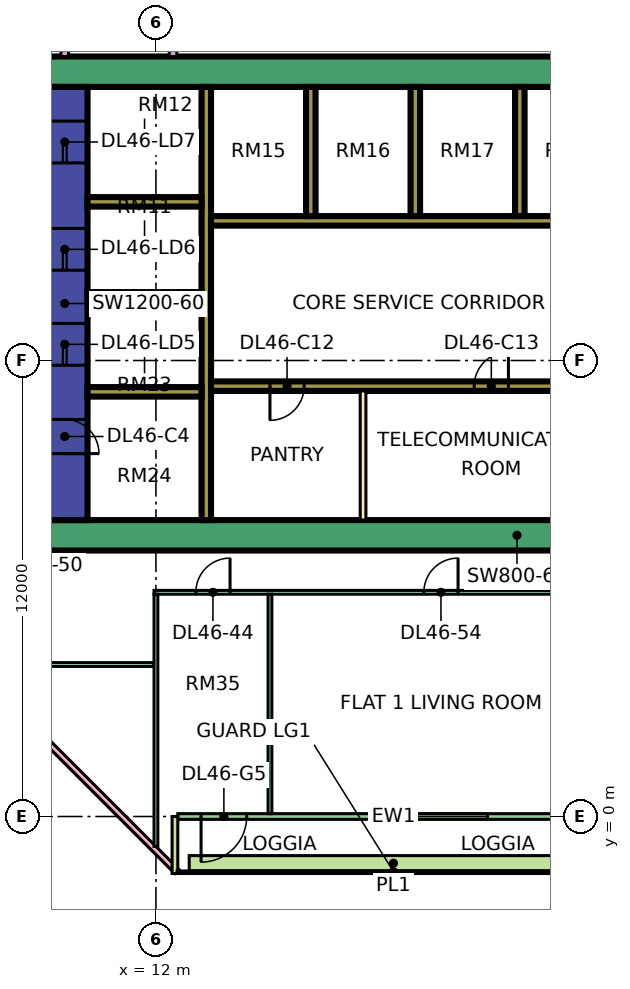
"""IFC4 building model, lengths in metres.
Left out: names, types, materials, properties, quantities, classifications, styles, units other than length and angle.
Written with IfcOpenShell. Run it as: python <this file> out.ifc"""

import sys

from ifc_helpers import new_model, si_unit, direction, frame, frame_2d, origin, place, context, subcontext, project, spatial, rectangle, extrude, element, fill, save


model = new_model("IFC4")
c1 = context("Model", 3, precision=1e-05, world=origin(), true_north=direction((0.0, 1.0)))
c2 = subcontext(c1, "Body", "Model", "MODEL_VIEW")
j1 = project(units=[si_unit("LENGTHUNIT", "METRE"), si_unit("PLANEANGLEUNIT", "RADIAN")], contexts=[c1])
p1 = place(None, origin())
s1 = spatial("IfcSite", under=j1, at=p1, CompositionType="ELEMENT")
p2 = place(p1, origin())
s2 = spatial("IfcBuilding", under=s1, at=p2, CompositionType="ELEMENT")
p3 = place(p2, frame((0.0, 0.0, 198.65)))
s3 = spatial("IfcBuildingStorey", under=s2, at=p3, CompositionType="ELEMENT", Elevation=198.65)
p4 = place(p3, frame((9.0, 7.4, 0.0), z_axis=(0.0, 0.0, 1.0), x_axis=(1.0, 0.0, 0.0)))
e1 = element("IfcWall", 1, at=p4, inside=s3, PredefinedType="SHEAR", context=c2, shape_type="SweptSolid", body=[
    extrude(rectangle(XDim=25.0, YDim=0.8, at=frame_2d((12.5, 0.0))), origin(), (0.0, 0.0, 1.0), 3.75),
])
p5 = place(p3, frame((9.0, 19.6, 0.0), z_axis=(0.0, 0.0, 1.0), x_axis=(1.0, 0.0, 0.0)))
e2 = element("IfcWall", 2, at=p5, inside=s3, PredefinedType="SHEAR", context=c2, shape_type="SweptSolid", body=[
    extrude(rectangle(XDim=25.0, YDim=0.8, at=frame_2d((12.5, 0.0))), origin(), (0.0, 0.0, 1.0), 3.75),
])
p6 = place(p5, frame((19.1, 0.0, 0.0)))
e3 = element("IfcOpeningElement", 3, at=p6, cuts=e2, PredefinedType="OPENING", context=c2, shape_type="SweptSolid", body=[
    extrude(rectangle(XDim=1.8, YDim=2.4, at=frame_2d((0.9, 1.2))), frame((0.0, 0.41, 0.0), z_axis=(0.0, -1.0, 0.0), x_axis=(1.0, 0.0, 0.0)), (0.0, 0.0, 1.0), 0.82),
])
p7 = place(p3, frame((9.6, 7.8, 0.0), z_axis=(0.0, 0.0, 1.0), x_axis=(0.0, 1.0, 0.0)))
e4 = element("IfcWall", 4, at=p7, inside=s3, PredefinedType="SHEAR", context=c2, shape_type="SweptSolid", body=[
    extrude(rectangle(XDim=11.4, YDim=1.2, at=frame_2d((5.7, 0.0))), origin(), (0.0, 0.0, 1.0), 3.75),
])
p8 = place(p7, frame((4.075, 0.0, 0.0)))
e5 = element("IfcOpeningElement", 5, at=p8, cuts=e4, PredefinedType="OPENING", context=c2, shape_type="SweptSolid", body=[
    extrude(rectangle(XDim=1.1, YDim=2.2, at=frame_2d((0.55, 1.1))), frame((0.0, 0.61, 0.0), z_axis=(0.0, -1.0, 0.0), x_axis=(1.0, 0.0, 0.0)), (0.0, 0.0, 1.0), 1.22),
])
p9 = place(p7, frame((6.575, 0.0, 0.0)))
e6 = element("IfcOpeningElement", 6, at=p9, cuts=e4, PredefinedType="OPENING", context=c2, shape_type="SweptSolid", body=[
    extrude(rectangle(XDim=1.1, YDim=2.2, at=frame_2d((0.55, 1.1))), frame((0.0, 0.61, 0.0), z_axis=(0.0, -1.0, 0.0), x_axis=(1.0, 0.0, 0.0)), (0.0, 0.0, 1.0), 1.22),
])
p10 = place(p7, frame((9.4, 0.0, 0.0)))
e7 = element("IfcOpeningElement", 7, at=p10, cuts=e4, PredefinedType="OPENING", context=c2, shape_type="SweptSolid", body=[
    extrude(rectangle(XDim=1.1, YDim=2.2, at=frame_2d((0.55, 1.1))), frame((0.0, 0.61, 0.0), z_axis=(0.0, -1.0, 0.0), x_axis=(1.0, 0.0, 0.0)), (0.0, 0.0, 1.0), 1.22),
])
p11 = place(p7, frame((1.75, 0.0, 0.0)))
e8 = element("IfcOpeningElement", 8, at=p11, cuts=e4, PredefinedType="OPENING", context=c2, shape_type="SweptSolid", body=[
    extrude(rectangle(XDim=0.9, YDim=2.1, at=frame_2d((0.45, 1.05))), frame((0.0, 0.61, 0.0), z_axis=(0.0, -1.0, 0.0), x_axis=(1.0, 0.0, 0.0)), (0.0, 0.0, 1.0), 1.22),
])
p12 = place(p3, frame((13.325, 7.8, 0.0), z_axis=(0.0, 0.0, 1.0), x_axis=(0.0, 1.0, 0.0)))
e9 = element("IfcWall", 9, at=p12, inside=s3, PredefinedType="SHEAR", context=c2, shape_type="SweptSolid", body=[
    extrude(rectangle(XDim=11.4, YDim=0.25, at=frame_2d((5.7, 0.0))), origin(), (0.0, 0.0, 1.0), 3.75),
])
p13 = place(p3, frame((13.45, 11.325, 0.0), z_axis=(0.0, 0.0, 1.0), x_axis=(1.0, 0.0, 0.0)))
e10 = element("IfcWall", 10, at=p13, inside=s3, PredefinedType="SHEAR", context=c2, shape_type="SweptSolid", body=[
    extrude(rectangle(XDim=19.75, YDim=0.25, at=frame_2d((9.875, 0.0))), origin(), (0.0, 0.0, 1.0), 3.75),
])
p14 = place(p13, frame((11.65, 0.0, 0.0)))
e11 = element("IfcOpeningElement", 11, at=p14, cuts=e10, PredefinedType="OPENING", context=c2, shape_type="SweptSolid", body=[
    extrude(rectangle(XDim=1.2, YDim=2.2, at=frame_2d((0.6, 1.1))), frame((0.0, 0.135, 0.0), z_axis=(0.0, -1.0, 0.0), x_axis=(1.0, 0.0, 0.0)), (0.0, 0.0, 1.0), 0.27),
])
p15 = place(p13, frame((14.4, 0.0, 0.0)))
e12 = element("IfcOpeningElement", 12, at=p15, cuts=e10, PredefinedType="OPENING", context=c2, shape_type="SweptSolid", body=[
    extrude(rectangle(XDim=1.2, YDim=2.2, at=frame_2d((0.6, 1.1))), frame((0.0, 0.135, 0.0), z_axis=(0.0, -1.0, 0.0), x_axis=(1.0, 0.0, 0.0)), (0.0, 0.0, 1.0), 0.27),
])
p16 = place(p13, frame((17.15, 0.0, 0.0)))
e13 = element("IfcOpeningElement", 13, at=p16, cuts=e10, PredefinedType="OPENING", context=c2, shape_type="SweptSolid", body=[
    extrude(rectangle(XDim=1.2, YDim=2.2, at=frame_2d((0.6, 1.1))), frame((0.0, 0.135, 0.0), z_axis=(0.0, -1.0, 0.0), x_axis=(1.0, 0.0, 0.0)), (0.0, 0.0, 1.0), 0.27),
])
p17 = place(p13, frame((1.55, 0.0, 0.0)))
e14 = element("IfcOpeningElement", 14, at=p17, cuts=e10, PredefinedType="OPENING", context=c2, shape_type="SweptSolid", body=[
    extrude(rectangle(XDim=0.9, YDim=2.1, at=frame_2d((0.45, 1.05))), frame((0.0, 0.135, 0.0), z_axis=(0.0, -1.0, 0.0), x_axis=(1.0, 0.0, 0.0)), (0.0, 0.0, 1.0), 0.27),
])
p18 = place(p13, frame((6.925, 0.0, 0.0)))
e15 = element("IfcOpeningElement", 15, at=p18, cuts=e10, PredefinedType="OPENING", context=c2, shape_type="SweptSolid", body=[
    extrude(rectangle(XDim=0.9, YDim=2.1, at=frame_2d((0.45, 1.05))), frame((0.0, 0.135, 0.0), z_axis=(0.0, -1.0, 0.0), x_axis=(1.0, 0.0, 0.0)), (0.0, 0.0, 1.0), 0.27),
])
p19 = place(p3, frame((13.45, 15.675, 0.0), z_axis=(0.0, 0.0, 1.0), x_axis=(1.0, 0.0, 0.0)))
e16 = element("IfcWall", 16, at=p19, inside=s3, PredefinedType="SHEAR", context=c2, shape_type="SweptSolid", body=[
    extrude(rectangle(XDim=13.75, YDim=0.25, at=frame_2d((6.875, 0.0))), origin(), (0.0, 0.0, 1.0), 3.75),
])
p20 = place(p19, frame((11.65, 0.0, 0.0)))
e17 = element("IfcOpeningElement", 17, at=p20, cuts=e16, PredefinedType="OPENING", context=c2, shape_type="SweptSolid", body=[
    extrude(rectangle(XDim=1.2, YDim=2.2, at=frame_2d((0.6, 1.1))), frame((0.0, 0.135, 0.0), z_axis=(0.0, -1.0, 0.0), x_axis=(1.0, 0.0, 0.0)), (0.0, 0.0, 1.0), 0.27),
])
for number, where, z_axis, x_axis in (
    (18, (10.2, 11.175, 0.0), (0.0, 0.0, 1.0), (1.0, 0.0, 0.0)),
    (19, (10.2, 13.675, 0.0), (0.0, 0.0, 1.0), (1.0, 0.0, 0.0)),
    (20, (10.2, 16.175, 0.0), (0.0, 0.0, 1.0), (1.0, 0.0, 0.0)),
):
    element("IfcWall", number, at=place(p3, frame(where, z_axis=z_axis, x_axis=x_axis)), inside=s3, PredefinedType="SHEAR", context=c2, shape_type="SweptSolid", body=[
        extrude(rectangle(XDim=3.0, YDim=0.25, at=frame_2d((1.5, 0.0))), origin(), (0.0, 0.0, 1.0), 3.75),
    ])
for number, where, z_axis, x_axis in (
    (21, (16.075, 15.8, 0.0), (0.0, 0.0, 1.0), (0.0, 1.0, 0.0)),
    (22, (18.825, 15.8, 0.0), (0.0, 0.0, 1.0), (0.0, 1.0, 0.0)),
    (23, (21.575, 15.8, 0.0), (0.0, 0.0, 1.0), (0.0, 1.0, 0.0)),
):
    element("IfcWall", number, at=place(p3, frame(where, z_axis=z_axis, x_axis=x_axis)), inside=s3, PredefinedType="SHEAR", context=c2, shape_type="SweptSolid", body=[
        extrude(rectangle(XDim=3.4, YDim=0.25, at=frame_2d((1.7, 0.0))), origin(), (0.0, 0.0, 1.0), 3.75),
    ])
p21 = place(p3, frame((-1.447, 12.553, 0.0), z_axis=(0.0, 0.0, 1.0), x_axis=(0.707106781187, -0.707106781187, 0.0)))
e24 = element("IfcWall", 24, at=p21, inside=s3, PredefinedType="SOLIDWALL", context=c2, shape_type="SweptSolid", body=[
    extrude(rectangle(XDim=19.799, YDim=0.15, at=frame_2d((9.899, 0.0))), origin(), (0.0, 0.0, 1.0), 3.35),
])
p22 = place(p21, frame((2.212, 0.0, 0.45)))
e25 = element("IfcOpeningElement", 25, at=p22, cuts=e24, PredefinedType="OPENING", context=c2, shape_type="SweptSolid", body=[
    extrude(rectangle(XDim=3.0, YDim=2.4, at=frame_2d((1.5, 1.2))), frame((0.0, 0.085, 0.0), z_axis=(0.0, -1.0, 0.0), x_axis=(1.0, 0.0, 0.0)), (0.0, 0.0, 1.0), 0.17),
])
p23 = place(p21, frame((10.216, 0.0, 0.45)))
e26 = element("IfcOpeningElement", 26, at=p23, cuts=e24, PredefinedType="OPENING", context=c2, shape_type="SweptSolid", body=[
    extrude(rectangle(XDim=3.0, YDim=2.4, at=frame_2d((1.5, 1.2))), frame((0.0, 0.085, 0.0), z_axis=(0.0, -1.0, 0.0), x_axis=(1.0, 0.0, 0.0)), (0.0, 0.0, 1.0), 0.17),
])
p24 = place(p3, frame((12.575, 0.0, 0.0), z_axis=(0.0, 0.0, 1.0), x_axis=(1.0, 0.0, 0.0)))
e27 = element("IfcWall", 27, at=p24, inside=s3, PredefinedType="SOLIDWALL", context=c2, shape_type="SweptSolid", body=[
    extrude(rectangle(XDim=11.35, YDim=0.15, at=frame_2d((5.675, 0.0))), origin(), (0.0, 0.0, 1.0), 3.35),
])
p25 = place(p24, frame((0.613, 0.0, 0.0)))
e28 = element("IfcOpeningElement", 28, at=p25, cuts=e27, PredefinedType="OPENING", context=c2, shape_type="SweptSolid", body=[
    extrude(rectangle(XDim=1.2, YDim=2.4, at=frame_2d((0.6, 1.2))), frame((0.0, 0.085, 0.0), z_axis=(0.0, -1.0, 0.0), x_axis=(1.0, 0.0, 0.0)), (0.0, 0.0, 1.0), 0.17),
])
p26 = place(p24, frame((5.15, 0.0, 0.45)))
e29 = element("IfcOpeningElement", 29, at=p26, cuts=e27, PredefinedType="OPENING", context=c2, shape_type="SweptSolid", body=[
    extrude(rectangle(XDim=3.0, YDim=2.4, at=frame_2d((1.5, 1.2))), frame((0.0, 0.085, 0.0), z_axis=(0.0, -1.0, 0.0), x_axis=(1.0, 0.0, 0.0)), (0.0, 0.0, 1.0), 0.17),
])
p27 = place(p3, frame((12.5, -1.5, 0.0), z_axis=(0.0, 0.0, 1.0), x_axis=(0.0, 1.0, 0.0)))
e30 = element("IfcWall", 30, at=p27, inside=s3, PredefinedType="SOLIDWALL", context=c2, shape_type="SweptSolid", body=[
    extrude(rectangle(XDim=1.5, YDim=0.15, at=frame_2d((0.75, 0.0))), origin(), (0.0, 0.0, 1.0), 3.35),
])
p28 = place(p3, frame((12.875, -1.229, 0.0), z_axis=(0.0, 0.0, 1.0), x_axis=(1.0, 0.0, 0.0)))
e31 = element("IfcWall", 31, at=p28, inside=s3, PredefinedType="SOLIDWALL", context=c2, shape_type="SweptSolid", body=[
    extrude(rectangle(XDim=10.75, YDim=0.4, at=frame_2d((5.375, 0.0))), origin(), (0.0, 0.0, 1.0), 0.7),
])
p29 = place(p3, frame((17.45, 7.8, 0.0), z_axis=(0.0, 0.0, 1.0), x_axis=(0.0, 1.0, 0.0)))
e32 = element("IfcWall", 32, at=p29, inside=s3, PredefinedType="PARTITIONING", context=c2, shape_type="SweptSolid", body=[
    extrude(rectangle(XDim=3.4, YDim=0.15, at=frame_2d((1.7, 0.0))), origin(), (0.0, 0.0, 1.0), 3.35),
])
p30 = place(p3, frame((9.05, 4.0, 0.0), z_axis=(0.0, 0.0, 1.0), x_axis=(1.0, 0.0, 0.0)))
e33 = element("IfcWall", 33, at=p30, inside=s3, PredefinedType="PARTITIONING", context=c2, shape_type="SweptSolid", body=[
    extrude(rectangle(XDim=2.9, YDim=0.1, at=frame_2d((1.45, 0.0))), origin(), (0.0, 0.0, 1.0), 3.35),
])
p31 = place(p3, frame((9.6, 20.0, 0.0), z_axis=(0.0, 0.0, 1.0), x_axis=(0.0, 1.0, 0.0)))
e34 = element("IfcWall", 34, at=p31, inside=s3, PredefinedType="PARTITIONING", context=c2, shape_type="SweptSolid", body=[
    extrude(rectangle(XDim=44.35, YDim=0.2, at=frame_2d((22.175, 0.0))), origin(), (0.0, 0.0, 1.0), 3.35),
])
p32 = place(p31, frame((17.1, 0.0, 0.0)))
e35 = element("IfcOpeningElement", 35, at=p32, cuts=e34, PredefinedType="OPENING", context=c2, shape_type="SweptSolid", body=[
    extrude(rectangle(XDim=1.0, YDim=2.1, at=frame_2d((0.5, 1.05))), frame((0.0, 0.11, 0.0), z_axis=(0.0, -1.0, 0.0), x_axis=(1.0, 0.0, 0.0)), (0.0, 0.0, 1.0), 0.22),
])
p33 = place(p31, frame((29.1, 0.0, 0.0)))
e36 = element("IfcOpeningElement", 36, at=p33, cuts=e34, PredefinedType="OPENING", context=c2, shape_type="SweptSolid", body=[
    extrude(rectangle(XDim=1.0, YDim=2.1, at=frame_2d((0.5, 1.05))), frame((0.0, 0.11, 0.0), z_axis=(0.0, -1.0, 0.0), x_axis=(1.0, 0.0, 0.0)), (0.0, 0.0, 1.0), 0.22),
])
p34 = place(p31, frame((0.6, 0.0, 0.0)))
e37 = element("IfcOpeningElement", 37, at=p34, cuts=e34, PredefinedType="OPENING", context=c2, shape_type="SweptSolid", body=[
    extrude(rectangle(XDim=1.2, YDim=2.1, at=frame_2d((0.6, 1.05))), frame((0.0, 0.11, 0.0), z_axis=(0.0, -1.0, 0.0), x_axis=(1.0, 0.0, 0.0)), (0.0, 0.0, 1.0), 0.22),
])
p35 = place(p31, frame((4.35, 0.0, 0.0)))
e38 = element("IfcOpeningElement", 38, at=p35, cuts=e34, PredefinedType="OPENING", context=c2, shape_type="SweptSolid", body=[
    extrude(rectangle(XDim=1.0, YDim=2.1, at=frame_2d((0.5, 1.05))), frame((0.0, 0.11, 0.0), z_axis=(0.0, -1.0, 0.0), x_axis=(1.0, 0.0, 0.0)), (0.0, 0.0, 1.0), 0.22),
])
p36 = place(p3, frame((11.95, 5.9, 0.0), z_axis=(0.0, 0.0, 1.0), x_axis=(1.0, 0.0, 0.0)))
e39 = element("IfcWall", 39, at=p36, inside=s3, PredefinedType="PARTITIONING", context=c2, shape_type="SweptSolid", body=[
    extrude(rectangle(XDim=21.1, YDim=0.1, at=frame_2d((10.55, 0.0))), origin(), (0.0, 0.0, 1.0), 3.35),
])
p37 = place(p36, frame((1.1, 0.0, 0.0)))
e40 = element("IfcOpeningElement", 40, at=p37, cuts=e39, PredefinedType="OPENING", context=c2, shape_type="SweptSolid", body=[
    extrude(rectangle(XDim=0.9, YDim=2.1, at=frame_2d((0.45, 1.05))), frame((0.0, 0.06, 0.0), z_axis=(0.0, -1.0, 0.0), x_axis=(1.0, 0.0, 0.0)), (0.0, 0.0, 1.0), 0.12),
])
p38 = place(p36, frame((13.1, 0.0, 0.0)))
e41 = element("IfcOpeningElement", 41, at=p38, cuts=e39, PredefinedType="OPENING", context=c2, shape_type="SweptSolid", body=[
    extrude(rectangle(XDim=0.9, YDim=2.1, at=frame_2d((0.45, 1.05))), frame((0.0, 0.06, 0.0), z_axis=(0.0, -1.0, 0.0), x_axis=(1.0, 0.0, 0.0)), (0.0, 0.0, 1.0), 0.12),
])
p39 = place(p36, frame((16.1, 0.0, 0.0)))
e42 = element("IfcOpeningElement", 42, at=p39, cuts=e39, PredefinedType="OPENING", context=c2, shape_type="SweptSolid", body=[
    extrude(rectangle(XDim=0.9, YDim=2.1, at=frame_2d((0.45, 1.05))), frame((0.0, 0.06, 0.0), z_axis=(0.0, -1.0, 0.0), x_axis=(1.0, 0.0, 0.0)), (0.0, 0.0, 1.0), 0.12),
])
p40 = place(p36, frame((7.1, 0.0, 0.0)))
e43 = element("IfcOpeningElement", 43, at=p40, cuts=e39, PredefinedType="OPENING", context=c2, shape_type="SweptSolid", body=[
    extrude(rectangle(XDim=0.9, YDim=2.1, at=frame_2d((0.45, 1.05))), frame((0.0, 0.06, 0.0), z_axis=(0.0, -1.0, 0.0), x_axis=(1.0, 0.0, 0.0)), (0.0, 0.0, 1.0), 0.12),
])
p41 = place(p3, frame((12.0, -0.788, 0.0), z_axis=(0.0, 0.0, 1.0), x_axis=(0.0, 1.0, 0.0)))
e44 = element("IfcWall", 44, at=p41, inside=s3, PredefinedType="PARTITIONING", context=c2, shape_type="SweptSolid", body=[
    extrude(rectangle(XDim=6.638, YDim=0.1, at=frame_2d((3.319, 0.0))), origin(), (0.0, 0.0, 1.0), 3.35),
])
p42 = place(p3, frame((12.45, 20.0, 0.0), z_axis=(0.0, 0.0, 1.0), x_axis=(0.0, 1.0, 0.0)))
e45 = element("IfcWall", 45, at=p42, inside=s3, PredefinedType="PARTITIONING", context=c2, shape_type="SweptSolid", body=[
    extrude(rectangle(XDim=42.926, YDim=0.2, at=frame_2d((21.463, 0.0))), origin(), (0.0, 0.0, 1.0), 3.35),
])
p43 = place(p42, frame((7.15, 0.0, 0.0)))
e46 = element("IfcOpeningElement", 46, at=p43, cuts=e45, PredefinedType="OPENING", context=c2, shape_type="SweptSolid", body=[
    extrude(rectangle(XDim=1.6, YDim=2.1, at=frame_2d((0.8, 1.05))), frame((0.0, 0.11, 0.0), z_axis=(0.0, -1.0, 0.0), x_axis=(1.0, 0.0, 0.0)), (0.0, 0.0, 1.0), 0.22),
])
p44 = place(p42, frame((13.5, 0.0, 0.0)))
e47 = element("IfcOpeningElement", 47, at=p44, cuts=e45, PredefinedType="OPENING", context=c2, shape_type="SweptSolid", body=[
    extrude(rectangle(XDim=1.0, YDim=2.1, at=frame_2d((0.5, 1.05))), frame((0.0, 0.11, 0.0), z_axis=(0.0, -1.0, 0.0), x_axis=(1.0, 0.0, 0.0)), (0.0, 0.0, 1.0), 0.22),
])
p45 = place(p42, frame((17.2, 0.0, 0.0)))
e48 = element("IfcOpeningElement", 48, at=p45, cuts=e45, PredefinedType="OPENING", context=c2, shape_type="SweptSolid", body=[
    extrude(rectangle(XDim=1.0, YDim=2.1, at=frame_2d((0.5, 1.05))), frame((0.0, 0.11, 0.0), z_axis=(0.0, -1.0, 0.0), x_axis=(1.0, 0.0, 0.0)), (0.0, 0.0, 1.0), 0.22),
])
p46 = place(p42, frame((35.2, 0.0, 0.0)))
e49 = element("IfcOpeningElement", 49, at=p46, cuts=e45, PredefinedType="OPENING", context=c2, shape_type="SweptSolid", body=[
    extrude(rectangle(XDim=1.0, YDim=2.1, at=frame_2d((0.5, 1.05))), frame((0.0, 0.11, 0.0), z_axis=(0.0, -1.0, 0.0), x_axis=(1.0, 0.0, 0.0)), (0.0, 0.0, 1.0), 0.22),
])
p47 = place(p42, frame((1.15, 0.0, 0.0)))
e50 = element("IfcOpeningElement", 50, at=p47, cuts=e45, PredefinedType="OPENING", context=c2, shape_type="SweptSolid", body=[
    extrude(rectangle(XDim=1.8, YDim=2.1, at=frame_2d((0.9, 1.05))), frame((0.0, 0.11, 0.0), z_axis=(0.0, -1.0, 0.0), x_axis=(1.0, 0.0, 0.0)), (0.0, 0.0, 1.0), 0.22),
])
p48 = place(p42, frame((28.6, 0.0, 0.0)))
e51 = element("IfcOpeningElement", 51, at=p48, cuts=e45, PredefinedType="OPENING", context=c2, shape_type="SweptSolid", body=[
    extrude(rectangle(XDim=1.8, YDim=2.1, at=frame_2d((0.9, 1.05))), frame((0.0, 0.11, 0.0), z_axis=(0.0, -1.0, 0.0), x_axis=(1.0, 0.0, 0.0)), (0.0, 0.0, 1.0), 0.22),
])
p49 = place(p3, frame((15.0, 0.074, 0.0), z_axis=(0.0, 0.0, 1.0), x_axis=(0.0, 1.0, 0.0)))
e52 = element("IfcWall", 52, at=p49, inside=s3, PredefinedType="PARTITIONING", context=c2, shape_type="SweptSolid", body=[
    extrude(rectangle(XDim=5.776, YDim=0.1, at=frame_2d((2.888, 0.0))), origin(), (0.0, 0.0, 1.0), 3.35),
])
p50 = place(p25, frame((1.2, 0.0, 0.0), z_axis=(0.0, 0.0, 1.0), x_axis=(-1.0, 0.0, 0.0)))
e53 = element("IfcDoor", 53, at=p50, inside=s3, OperationType="DOUBLE_DOOR_SINGLE_SWING", PredefinedType="DOOR", context=c2, shape_type="SweptSolid", body=[
    extrude(rectangle(XDim=1.2, YDim=2.4, at=frame_2d((0.6, 1.2))), frame((0.0, 0.025, 0.0), z_axis=(0.0, -1.0, 0.0), x_axis=(1.0, 0.0, 0.0)), (0.0, 0.0, 1.0), 0.05),
])
fill(e28, e53)
p51 = place(p26, origin())
e54 = element("IfcWindow", 54, at=p51, inside=s3, PartitioningType="SINGLE_PANEL", PredefinedType="WINDOW", context=c2, shape_type="SweptSolid", body=[
    extrude(rectangle(XDim=3.0, YDim=2.4, at=frame_2d((1.5, 1.2))), frame((0.0, 0.03, 0.0), z_axis=(0.0, -1.0, 0.0), x_axis=(1.0, 0.0, 0.0)), (0.0, 0.0, 1.0), 0.06),
])
fill(e29, e54)
p52 = place(p8, origin())
e55 = element("IfcDoor", 55, at=p52, inside=s3, OperationType="DOUBLE_DOOR_SLIDING", PredefinedType="DOOR", context=c2, shape_type="SweptSolid", body=[
    extrude(rectangle(XDim=1.1, YDim=2.2, at=frame_2d((0.55, 1.1))), frame((0.0, 0.025, 0.0), z_axis=(0.0, -1.0, 0.0), x_axis=(1.0, 0.0, 0.0)), (0.0, 0.0, 1.0), 0.05),
])
fill(e5, e55)
p53 = place(p9, origin())
e56 = element("IfcDoor", 56, at=p53, inside=s3, OperationType="DOUBLE_DOOR_SLIDING", PredefinedType="DOOR", context=c2, shape_type="SweptSolid", body=[
    extrude(rectangle(XDim=1.1, YDim=2.2, at=frame_2d((0.55, 1.1))), frame((0.0, 0.025, 0.0), z_axis=(0.0, -1.0, 0.0), x_axis=(1.0, 0.0, 0.0)), (0.0, 0.0, 1.0), 0.05),
])
fill(e6, e56)
p54 = place(p10, origin())
e57 = element("IfcDoor", 57, at=p54, inside=s3, OperationType="DOUBLE_DOOR_SLIDING", PredefinedType="DOOR", context=c2, shape_type="SweptSolid", body=[
    extrude(rectangle(XDim=1.1, YDim=2.2, at=frame_2d((0.55, 1.1))), frame((0.0, 0.025, 0.0), z_axis=(0.0, -1.0, 0.0), x_axis=(1.0, 0.0, 0.0)), (0.0, 0.0, 1.0), 0.05),
])
fill(e7, e57)
p55 = place(p11, frame((0.9, 0.0, 0.0), z_axis=(0.0, 0.0, 1.0), x_axis=(-1.0, 0.0, 0.0)))
e58 = element("IfcDoor", 58, at=p55, inside=s3, OperationType="SINGLE_SWING_LEFT", PredefinedType="DOOR", context=c2, shape_type="SweptSolid", body=[
    extrude(rectangle(XDim=0.9, YDim=2.1, at=frame_2d((0.45, 1.05))), frame((0.0, 0.025, 0.0), z_axis=(0.0, -1.0, 0.0), x_axis=(1.0, 0.0, 0.0)), (0.0, 0.0, 1.0), 0.05),
])
fill(e8, e58)
p56 = place(p17, frame((0.9, 0.0, 0.0), z_axis=(0.0, 0.0, 1.0), x_axis=(-1.0, 0.0, 0.0)))
e59 = element("IfcDoor", 59, at=p56, inside=s3, OperationType="SINGLE_SWING_LEFT", PredefinedType="DOOR", context=c2, shape_type="SweptSolid", body=[
    extrude(rectangle(XDim=0.9, YDim=2.1, at=frame_2d((0.45, 1.05))), frame((0.0, 0.025, 0.0), z_axis=(0.0, -1.0, 0.0), x_axis=(1.0, 0.0, 0.0)), (0.0, 0.0, 1.0), 0.05),
])
fill(e14, e59)
p57 = place(p18, frame((0.9, 0.0, 0.0), z_axis=(0.0, 0.0, 1.0), x_axis=(-1.0, 0.0, 0.0)))
e60 = element("IfcDoor", 60, at=p57, inside=s3, OperationType="SINGLE_SWING_RIGHT", PredefinedType="DOOR", context=c2, shape_type="SweptSolid", body=[
    extrude(rectangle(XDim=0.9, YDim=2.1, at=frame_2d((0.45, 1.05))), frame((0.0, 0.025, 0.0), z_axis=(0.0, -1.0, 0.0), x_axis=(1.0, 0.0, 0.0)), (0.0, 0.0, 1.0), 0.05),
])
fill(e15, e60)
p58 = place(p37, frame((0.9, 0.0, 0.0), z_axis=(0.0, 0.0, 1.0), x_axis=(-1.0, 0.0, 0.0)))
e61 = element("IfcDoor", 61, at=p58, inside=s3, OperationType="SINGLE_SWING_RIGHT", PredefinedType="DOOR", context=c2, shape_type="SweptSolid", body=[
    extrude(rectangle(XDim=0.9, YDim=2.1, at=frame_2d((0.45, 1.05))), frame((0.0, 0.025, 0.0), z_axis=(0.0, -1.0, 0.0), x_axis=(1.0, 0.0, 0.0)), (0.0, 0.0, 1.0), 0.05),
])
fill(e40, e61)
p59 = place(p40, frame((0.9, 0.0, 0.0), z_axis=(0.0, 0.0, 1.0), x_axis=(-1.0, 0.0, 0.0)))
e62 = element("IfcDoor", 62, at=p59, inside=s3, OperationType="SINGLE_SWING_RIGHT", PredefinedType="DOOR", context=c2, shape_type="SweptSolid", body=[
    extrude(rectangle(XDim=0.9, YDim=2.1, at=frame_2d((0.45, 1.05))), frame((0.0, 0.025, 0.0), z_axis=(0.0, -1.0, 0.0), x_axis=(1.0, 0.0, 0.0)), (0.0, 0.0, 1.0), 0.05),
])
fill(e43, e62)
save(model, sys.argv[1])
